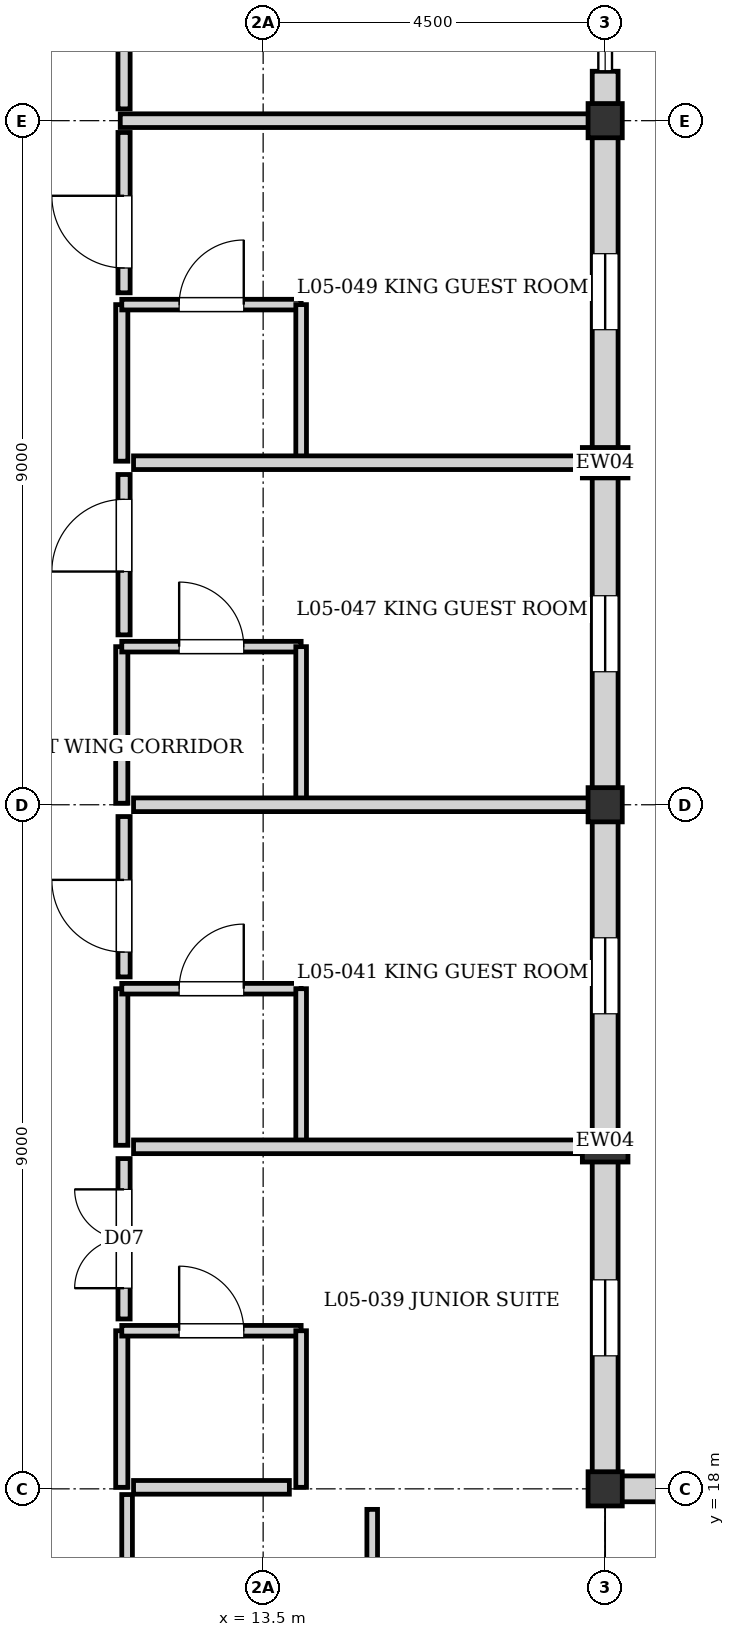
"""IFC4 building model, lengths in metres.
Left out: names, types, materials, properties, quantities, classifications, styles, units other than length and angle.
Written with IfcOpenShell. Run it as: python <this file> out.ifc"""

import sys

from ifc_helpers import new_model, si_unit, direction, frame, frame_2d, origin, origin_2d, place, context, subcontext, project, spatial, rectangle, extrude, element, fill, save


model = new_model("IFC4")
c1 = context("Model", 3, precision=1e-05, world=origin(), true_north=direction((0.0, 1.0)))
c2 = subcontext(c1, "Body", "Model", "MODEL_VIEW")
j1 = project(units=[si_unit("LENGTHUNIT", "METRE"), si_unit("PLANEANGLEUNIT", "RADIAN")], contexts=[c1])
p1 = place(None, origin())
s1 = spatial("IfcSite", under=j1, at=p1, CompositionType="ELEMENT")
p2 = place(p1, origin())
s2 = spatial("IfcBuilding", under=s1, at=p2, CompositionType="ELEMENT")
p3 = place(p2, frame((0.0, 0.0, 17.6)))
s3 = spatial("IfcBuildingStorey", under=s2, at=p3, CompositionType="ELEMENT", Elevation=17.6)
for number, where, z_axis, x_axis in (
    (1, (18.0, 18.0, 0.0), (0.0, 0.0, 1.0), (1.0, 0.0, 0.0)),
    (2, (18.0, 27.0, 0.0), (0.0, 0.0, 1.0), (1.0, 0.0, 0.0)),
    (3, (18.0, 36.0, 0.0), (0.0, 0.0, 1.0), (1.0, 0.0, 0.0)),
):
    element("IfcColumn", number, at=place(p3, frame(where, z_axis=z_axis, x_axis=x_axis)), inside=s3, PredefinedType="COLUMN", context=c2, shape_type="SweptSolid", body=[
        extrude(rectangle(XDim=0.45, YDim=0.45, at=origin_2d()), origin(), (0.0, 0.0, 1.0), 3.04),
    ])
for number, where, z_axis, x_axis in (
    (4, (18.0, 22.5, 0.0), (0.0, 0.0, 1.0), (0.0, 1.0, 0.0)),
    (5, (18.0, 31.5, 0.0), (0.0, 0.0, 1.0), (0.0, 1.0, 0.0)),
):
    element("IfcColumn", number, at=place(p3, frame(where, z_axis=z_axis, x_axis=x_axis)), inside=s3, PredefinedType="PILASTER", context=c2, shape_type="SweptSolid", body=[
        extrude(rectangle(XDim=0.4, YDim=0.6, at=origin_2d()), origin(), (0.0, 0.0, 1.0), 3.04),
    ])
p4 = place(p3, frame((18.0, 36.65, 0.0), z_axis=(0.0, 0.0, 1.0), x_axis=(0.0, -1.0, 0.0)))
e6 = element("IfcWall", 6, at=p4, inside=s3, PredefinedType="SOLIDWALL", context=c2, shape_type="SweptSolid", body=[
    extrude(rectangle(XDim=0.65, YDim=0.34, at=frame_2d((0.325, 0.0))), origin(), (0.0, 0.0, 1.0), 2.82),
])
p5 = place(p3, frame((18.0, 36.0, 0.0), z_axis=(0.0, 0.0, 1.0), x_axis=(0.0, -1.0, 0.0)))
e7 = element("IfcWall", 7, at=p5, inside=s3, PredefinedType="SOLIDWALL", context=c2, shape_type="SweptSolid", body=[
    extrude(rectangle(XDim=9.0, YDim=0.34, at=frame_2d((4.5, 0.0))), origin(), (0.0, 0.0, 1.0), 2.38),
])
p6 = place(p5, frame((1.75, 0.0, 0.35)))
e8 = element("IfcOpeningElement", 8, at=p6, cuts=e7, PredefinedType="OPENING", context=c2, shape_type="SweptSolid", body=[
    extrude(rectangle(XDim=1.0, YDim=1.6, at=frame_2d((0.5, 0.8))), frame((0.0, 0.18, 0.0), z_axis=(0.0, -1.0, 0.0), x_axis=(1.0, 0.0, 0.0)), (0.0, 0.0, 1.0), 0.36),
])
p7 = place(p5, frame((6.25, 0.0, 0.35)))
e9 = element("IfcOpeningElement", 9, at=p7, cuts=e7, PredefinedType="OPENING", context=c2, shape_type="SweptSolid", body=[
    extrude(rectangle(XDim=1.0, YDim=1.6, at=frame_2d((0.5, 0.8))), frame((0.0, 0.18, 0.0), z_axis=(0.0, -1.0, 0.0), x_axis=(1.0, 0.0, 0.0)), (0.0, 0.0, 1.0), 0.36),
])
p8 = place(p3, frame((18.0, 27.0, 0.0), z_axis=(0.0, 0.0, 1.0), x_axis=(0.0, -1.0, 0.0)))
e10 = element("IfcWall", 10, at=p8, inside=s3, PredefinedType="SOLIDWALL", context=c2, shape_type="SweptSolid", body=[
    extrude(rectangle(XDim=8.845, YDim=0.34, at=frame_2d((4.422, 0.0))), origin(), (0.0, 0.0, 1.0), 2.42),
])
p9 = place(p8, frame((1.75, 0.0, 0.35)))
e11 = element("IfcOpeningElement", 11, at=p9, cuts=e10, PredefinedType="OPENING", context=c2, shape_type="SweptSolid", body=[
    extrude(rectangle(XDim=1.0, YDim=1.6, at=frame_2d((0.5, 0.8))), frame((0.0, 0.18, 0.0), z_axis=(0.0, -1.0, 0.0), x_axis=(1.0, 0.0, 0.0)), (0.0, 0.0, 1.0), 0.36),
])
p10 = place(p8, frame((6.25, 0.0, 0.35)))
e12 = element("IfcOpeningElement", 12, at=p10, cuts=e10, PredefinedType="OPENING", context=c2, shape_type="SweptSolid", body=[
    extrude(rectangle(XDim=1.0, YDim=1.6, at=frame_2d((0.5, 0.8))), frame((0.0, 0.18, 0.0), z_axis=(0.0, -1.0, 0.0), x_axis=(1.0, 0.0, 0.0)), (0.0, 0.0, 1.0), 0.36),
])
p11 = place(p3, frame((18.0, 18.0, 0.0), z_axis=(0.0, 0.0, 1.0), x_axis=(1.0, 0.0, 0.0)))
e13 = element("IfcWall", 13, at=p11, inside=s3, PredefinedType="SOLIDWALL", context=c2, shape_type="SweptSolid", body=[
    extrude(rectangle(XDim=9.0, YDim=0.34, at=frame_2d((4.5, 0.0))), origin(), (0.0, 0.0, 1.0), 2.48),
])
p12 = place(p11, frame((1.75, 0.0, 0.35)))
e14 = element("IfcOpeningElement", 14, at=p12, cuts=e13, PredefinedType="OPENING", context=c2, shape_type="SweptSolid", body=[
    extrude(rectangle(XDim=1.0, YDim=1.6, at=frame_2d((0.5, 0.8))), frame((0.0, 0.18, 0.0), z_axis=(0.0, -1.0, 0.0), x_axis=(1.0, 0.0, 0.0)), (0.0, 0.0, 1.0), 0.36),
])
p13 = place(p11, frame((6.25, 0.0, 0.35)))
e15 = element("IfcOpeningElement", 15, at=p13, cuts=e13, PredefinedType="OPENING", context=c2, shape_type="SweptSolid", body=[
    extrude(rectangle(XDim=1.0, YDim=1.6, at=frame_2d((0.5, 0.8))), frame((0.0, 0.18, 0.0), z_axis=(0.0, -1.0, 0.0), x_axis=(1.0, 0.0, 0.0)), (0.0, 0.0, 1.0), 0.36),
])
p14 = place(p3, frame((11.64, 18.02, 0.0), z_axis=(0.0, 0.0, 1.0), x_axis=(0.0, 1.0, 0.0)))
e16 = element("IfcWall", 16, at=p14, inside=s3, PredefinedType="PARTITIONING", context=c2, shape_type="SweptSolid", body=[
    extrude(rectangle(XDim=2.06, YDim=0.16, at=frame_2d((1.03, 0.0))), origin(), (0.0, 0.0, 1.0), 2.82),
])
p15 = place(p3, frame((11.64, 20.08, 0.0), z_axis=(0.0, 0.0, 1.0), x_axis=(1.0, 0.0, 0.0)))
e17 = element("IfcWall", 17, at=p15, inside=s3, PredefinedType="PLUMBINGWALL", context=c2, shape_type="SweptSolid", body=[
    extrude(rectangle(XDim=2.36, YDim=0.14, at=frame_2d((1.18, 0.0))), origin(), (0.0, 0.0, 1.0), 2.82),
])
p16 = place(p15, frame((0.755, 0.0, 0.0)))
e18 = element("IfcOpeningElement", 18, at=p16, cuts=e17, PredefinedType="OPENING", context=c2, shape_type="SweptSolid", body=[
    extrude(rectangle(XDim=0.85, YDim=2.04, at=frame_2d((0.425, 1.02))), frame((0.0, 0.08, 0.0), z_axis=(0.0, -1.0, 0.0), x_axis=(1.0, 0.0, 0.0)), (0.0, 0.0, 1.0), 0.16),
])
p17 = place(p3, frame((14.0, 18.02, 0.0), z_axis=(0.0, 0.0, 1.0), x_axis=(0.0, 1.0, 0.0)))
e19 = element("IfcWall", 19, at=p17, inside=s3, PredefinedType="PLUMBINGWALL", context=c2, shape_type="SweptSolid", body=[
    extrude(rectangle(XDim=2.06, YDim=0.14, at=frame_2d((1.03, 0.0))), origin(), (0.0, 0.0, 1.0), 2.82),
])
p18 = place(p3, frame((11.64, 22.52, 0.0), z_axis=(0.0, 0.0, 1.0), x_axis=(0.0, 1.0, 0.0)))
e20 = element("IfcWall", 20, at=p18, inside=s3, PredefinedType="PARTITIONING", context=c2, shape_type="SweptSolid", body=[
    extrude(rectangle(XDim=2.06, YDim=0.16, at=frame_2d((1.03, 0.0))), origin(), (0.0, 0.0, 1.0), 2.82),
])
p19 = place(p3, frame((11.64, 24.58, 0.0), z_axis=(0.0, 0.0, 1.0), x_axis=(1.0, 0.0, 0.0)))
e21 = element("IfcWall", 21, at=p19, inside=s3, PredefinedType="PLUMBINGWALL", context=c2, shape_type="SweptSolid", body=[
    extrude(rectangle(XDim=2.36, YDim=0.14, at=frame_2d((1.18, 0.0))), origin(), (0.0, 0.0, 1.0), 2.82),
])
p20 = place(p19, frame((0.755, 0.0, 0.0)))
e22 = element("IfcOpeningElement", 22, at=p20, cuts=e21, PredefinedType="OPENING", context=c2, shape_type="SweptSolid", body=[
    extrude(rectangle(XDim=0.85, YDim=2.04, at=frame_2d((0.425, 1.02))), frame((0.0, 0.08, 0.0), z_axis=(0.0, -1.0, 0.0), x_axis=(1.0, 0.0, 0.0)), (0.0, 0.0, 1.0), 0.16),
])
p21 = place(p3, frame((14.0, 22.52, 0.0), z_axis=(0.0, 0.0, 1.0), x_axis=(0.0, 1.0, 0.0)))
e23 = element("IfcWall", 23, at=p21, inside=s3, PredefinedType="PLUMBINGWALL", context=c2, shape_type="SweptSolid", body=[
    extrude(rectangle(XDim=2.06, YDim=0.14, at=frame_2d((1.03, 0.0))), origin(), (0.0, 0.0, 1.0), 2.82),
])
p22 = place(p3, frame((11.64, 27.02, 0.0), z_axis=(0.0, 0.0, 1.0), x_axis=(0.0, 1.0, 0.0)))
e24 = element("IfcWall", 24, at=p22, inside=s3, PredefinedType="PARTITIONING", context=c2, shape_type="SweptSolid", body=[
    extrude(rectangle(XDim=2.06, YDim=0.16, at=frame_2d((1.03, 0.0))), origin(), (0.0, 0.0, 1.0), 2.82),
])
p23 = place(p3, frame((11.64, 29.08, 0.0), z_axis=(0.0, 0.0, 1.0), x_axis=(1.0, 0.0, 0.0)))
e25 = element("IfcWall", 25, at=p23, inside=s3, PredefinedType="PLUMBINGWALL", context=c2, shape_type="SweptSolid", body=[
    extrude(rectangle(XDim=2.36, YDim=0.14, at=frame_2d((1.18, 0.0))), origin(), (0.0, 0.0, 1.0), 2.82),
])
p24 = place(p23, frame((0.755, 0.0, 0.0)))
e26 = element("IfcOpeningElement", 26, at=p24, cuts=e25, PredefinedType="OPENING", context=c2, shape_type="SweptSolid", body=[
    extrude(rectangle(XDim=0.85, YDim=2.04, at=frame_2d((0.425, 1.02))), frame((0.0, 0.08, 0.0), z_axis=(0.0, -1.0, 0.0), x_axis=(1.0, 0.0, 0.0)), (0.0, 0.0, 1.0), 0.16),
])
p25 = place(p3, frame((14.0, 27.02, 0.0), z_axis=(0.0, 0.0, 1.0), x_axis=(0.0, 1.0, 0.0)))
e27 = element("IfcWall", 27, at=p25, inside=s3, PredefinedType="PLUMBINGWALL", context=c2, shape_type="SweptSolid", body=[
    extrude(rectangle(XDim=2.06, YDim=0.14, at=frame_2d((1.03, 0.0))), origin(), (0.0, 0.0, 1.0), 2.82),
])
p26 = place(p3, frame((11.64, 31.52, 0.0), z_axis=(0.0, 0.0, 1.0), x_axis=(0.0, 1.0, 0.0)))
e28 = element("IfcWall", 28, at=p26, inside=s3, PredefinedType="PARTITIONING", context=c2, shape_type="SweptSolid", body=[
    extrude(rectangle(XDim=2.06, YDim=0.16, at=frame_2d((1.03, 0.0))), origin(), (0.0, 0.0, 1.0), 2.82),
])
p27 = place(p3, frame((11.64, 33.58, 0.0), z_axis=(0.0, 0.0, 1.0), x_axis=(1.0, 0.0, 0.0)))
e29 = element("IfcWall", 29, at=p27, inside=s3, PredefinedType="PLUMBINGWALL", context=c2, shape_type="SweptSolid", body=[
    extrude(rectangle(XDim=2.36, YDim=0.14, at=frame_2d((1.18, 0.0))), origin(), (0.0, 0.0, 1.0), 2.82),
])
p28 = place(p27, frame((0.755, 0.0, 0.0)))
e30 = element("IfcOpeningElement", 30, at=p28, cuts=e29, PredefinedType="OPENING", context=c2, shape_type="SweptSolid", body=[
    extrude(rectangle(XDim=0.85, YDim=2.04, at=frame_2d((0.425, 1.02))), frame((0.0, 0.08, 0.0), z_axis=(0.0, -1.0, 0.0), x_axis=(1.0, 0.0, 0.0)), (0.0, 0.0, 1.0), 0.16),
])
p29 = place(p3, frame((14.0, 31.52, 0.0), z_axis=(0.0, 0.0, 1.0), x_axis=(0.0, 1.0, 0.0)))
e31 = element("IfcWall", 31, at=p29, inside=s3, PredefinedType="PLUMBINGWALL", context=c2, shape_type="SweptSolid", body=[
    extrude(rectangle(XDim=2.06, YDim=0.14, at=frame_2d((1.03, 0.0))), origin(), (0.0, 0.0, 1.0), 2.82),
])
p30 = place(p3, frame((11.795, 22.5, 0.0), z_axis=(0.0, 0.0, 1.0), x_axis=(1.0, 0.0, 0.0)))
e32 = element("IfcWall", 32, at=p30, inside=s3, PredefinedType="PARTITIONING", context=c2, shape_type="SweptSolid", body=[
    extrude(rectangle(XDim=6.03, YDim=0.18, at=frame_2d((3.015, 0.0))), origin(), (0.0, 0.0, 1.0), 2.82),
])
p31 = place(p3, frame((11.795, 27.0, 0.0), z_axis=(0.0, 0.0, 1.0), x_axis=(1.0, 0.0, 0.0)))
e33 = element("IfcWall", 33, at=p31, inside=s3, PredefinedType="PARTITIONING", context=c2, shape_type="SweptSolid", body=[
    extrude(rectangle(XDim=6.03, YDim=0.18, at=frame_2d((3.015, 0.0))), origin(), (0.0, 0.0, 1.0), 2.29),
])
p32 = place(p3, frame((11.795, 31.5, 0.0), z_axis=(0.0, 0.0, 1.0), x_axis=(1.0, 0.0, 0.0)))
e34 = element("IfcWall", 34, at=p32, inside=s3, PredefinedType="PARTITIONING", context=c2, shape_type="SweptSolid", body=[
    extrude(rectangle(XDim=6.03, YDim=0.18, at=frame_2d((3.015, 0.0))), origin(), (0.0, 0.0, 1.0), 2.82),
])
p33 = place(p3, frame((11.62, 36.0, 0.0), z_axis=(0.0, 0.0, 1.0), x_axis=(1.0, 0.0, 0.0)))
e35 = element("IfcWall", 35, at=p33, inside=s3, PredefinedType="PARTITIONING", context=c2, shape_type="SweptSolid", body=[
    extrude(rectangle(XDim=6.205, YDim=0.18, at=frame_2d((3.103, 0.0))), origin(), (0.0, 0.0, 1.0), 2.42),
])
p34 = place(p3, frame((11.795, 18.02, 0.0), z_axis=(0.0, 0.0, 1.0), x_axis=(1.0, 0.0, 0.0)))
e36 = element("IfcWall", 36, at=p34, inside=s3, PredefinedType="PARTITIONING", context=c2, shape_type="SweptSolid", body=[
    extrude(rectangle(XDim=2.05, YDim=0.18, at=frame_2d((1.025, 0.0))), origin(), (0.0, 0.0, 1.0), 2.55),
])
p35 = place(p3, frame((11.71, 11.705, 0.0), z_axis=(0.0, 0.0, 1.0), x_axis=(0.0, 1.0, 0.0)))
e37 = element("IfcWall", 37, at=p35, inside=s3, PredefinedType="PLUMBINGWALL", context=c2, shape_type="SweptSolid", body=[
    extrude(rectangle(XDim=6.22, YDim=0.14, at=frame_2d((3.11, 0.0))), origin(), (0.0, 0.0, 1.0), 2.82),
])
p36 = place(p35, frame((1.914, 0.0, 0.0)))
e38 = element("IfcOpeningElement", 38, at=p36, cuts=e37, PredefinedType="OPENING", context=c2, shape_type="SweptSolid", body=[
    extrude(rectangle(XDim=0.9, YDim=2.1, at=frame_2d((0.45, 1.05))), frame((0.0, 0.08, 0.0), z_axis=(0.0, -1.0, 0.0), x_axis=(1.0, 0.0, 0.0)), (0.0, 0.0, 1.0), 0.16),
])
p37 = place(p3, frame((11.67, 20.235, 0.0), z_axis=(0.0, 0.0, 1.0), x_axis=(0.0, 1.0, 0.0)))
e39 = element("IfcWall", 39, at=p37, inside=s3, PredefinedType="PARTITIONING", context=c2, shape_type="SweptSolid", body=[
    extrude(rectangle(XDim=2.11, YDim=0.16, at=frame_2d((1.055, 0.0))), origin(), (0.0, 0.0, 1.0), 2.82),
])
p38 = place(p37, frame((0.405, 0.0, 0.0)))
e40 = element("IfcOpeningElement", 40, at=p38, cuts=e39, PredefinedType="OPENING", context=c2, shape_type="SweptSolid", body=[
    extrude(rectangle(XDim=1.3, YDim=2.25, at=frame_2d((0.65, 1.125))), frame((0.0, 0.09, 0.0), z_axis=(0.0, -1.0, 0.0), x_axis=(1.0, 0.0, 0.0)), (0.0, 0.0, 1.0), 0.18),
])
p39 = place(p3, frame((11.67, 24.735, 0.0), z_axis=(0.0, 0.0, 1.0), x_axis=(0.0, 1.0, 0.0)))
e41 = element("IfcWall", 41, at=p39, inside=s3, PredefinedType="PARTITIONING", context=c2, shape_type="SweptSolid", body=[
    extrude(rectangle(XDim=2.11, YDim=0.16, at=frame_2d((1.055, 0.0))), origin(), (0.0, 0.0, 1.0), 2.82),
])
p40 = place(p39, frame((0.327, 0.0, 0.0)))
e42 = element("IfcOpeningElement", 42, at=p40, cuts=e41, PredefinedType="OPENING", context=c2, shape_type="SweptSolid", body=[
    extrude(rectangle(XDim=0.95, YDim=2.15, at=frame_2d((0.475, 1.075))), frame((0.0, 0.09, 0.0), z_axis=(0.0, -1.0, 0.0), x_axis=(1.0, 0.0, 0.0)), (0.0, 0.0, 1.0), 0.18),
])
p41 = place(p3, frame((11.67, 29.235, 0.0), z_axis=(0.0, 0.0, 1.0), x_axis=(0.0, 1.0, 0.0)))
e43 = element("IfcWall", 43, at=p41, inside=s3, PredefinedType="PARTITIONING", context=c2, shape_type="SweptSolid", body=[
    extrude(rectangle(XDim=2.11, YDim=0.16, at=frame_2d((1.055, 0.0))), origin(), (0.0, 0.0, 1.0), 2.82),
])
p42 = place(p41, frame((0.833, 0.0, 0.0)))
e44 = element("IfcOpeningElement", 44, at=p42, cuts=e43, PredefinedType="OPENING", context=c2, shape_type="SweptSolid", body=[
    extrude(rectangle(XDim=0.95, YDim=2.15, at=frame_2d((0.475, 1.075))), frame((0.0, 0.09, 0.0), z_axis=(0.0, -1.0, 0.0), x_axis=(1.0, 0.0, 0.0)), (0.0, 0.0, 1.0), 0.18),
])
p43 = place(p3, frame((11.67, 33.735, 0.0), z_axis=(0.0, 0.0, 1.0), x_axis=(0.0, 1.0, 0.0)))
e45 = element("IfcWall", 45, at=p43, inside=s3, PredefinedType="PARTITIONING", context=c2, shape_type="SweptSolid", body=[
    extrude(rectangle(XDim=2.11, YDim=0.16, at=frame_2d((1.055, 0.0))), origin(), (0.0, 0.0, 1.0), 2.82),
])
p44 = place(p43, frame((0.327, 0.0, 0.0)))
e46 = element("IfcOpeningElement", 46, at=p44, cuts=e45, PredefinedType="OPENING", context=c2, shape_type="SweptSolid", body=[
    extrude(rectangle(XDim=0.95, YDim=2.15, at=frame_2d((0.475, 1.075))), frame((0.0, 0.09, 0.0), z_axis=(0.0, -1.0, 0.0), x_axis=(1.0, 0.0, 0.0)), (0.0, 0.0, 1.0), 0.18),
])
p45 = place(p3, frame((11.67, 36.155, 0.0), z_axis=(0.0, 0.0, 1.0), x_axis=(0.0, 1.0, 0.0)))
e47 = element("IfcWall", 47, at=p45, inside=s3, PredefinedType="PARTITIONING", context=c2, shape_type="SweptSolid", body=[
    extrude(rectangle(XDim=4.125, YDim=0.16, at=frame_2d((2.062, 0.0))), origin(), (0.0, 0.0, 1.0), 2.82),
])
p46 = place(p45, frame((2.058, 0.0, 0.0)))
e48 = element("IfcOpeningElement", 48, at=p46, cuts=e47, PredefinedType="OPENING", context=c2, shape_type="SweptSolid", body=[
    extrude(rectangle(XDim=1.0, YDim=2.1, at=frame_2d((0.5, 1.05))), frame((0.0, 0.09, 0.0), z_axis=(0.0, -1.0, 0.0), x_axis=(1.0, 0.0, 0.0)), (0.0, 0.0, 1.0), 0.18),
])
p47 = place(p3, frame((14.935, 14.845, 0.0), z_axis=(0.0, 0.0, 1.0), x_axis=(0.0, 1.0, 0.0)))
e49 = element("IfcWall", 49, at=p47, inside=s3, PredefinedType="PLUMBINGWALL", context=c2, shape_type="SweptSolid", body=[
    extrude(rectangle(XDim=2.885, YDim=0.14, at=frame_2d((1.442, 0.0))), origin(), (0.0, 0.0, 1.0), 2.82),
])
p48 = place(p47, frame((0.646, 0.0, 0.0)))
e50 = element("IfcOpeningElement", 50, at=p48, cuts=e49, PredefinedType="OPENING", context=c2, shape_type="SweptSolid", body=[
    extrude(rectangle(XDim=0.9, YDim=2.1, at=frame_2d((0.45, 1.05))), frame((0.0, 0.08, 0.0), z_axis=(0.0, -1.0, 0.0), x_axis=(1.0, 0.0, 0.0)), (0.0, 0.0, 1.0), 0.16),
])
p49 = place(p6, origin())
e51 = element("IfcWindow", 51, at=p49, inside=s3, PartitioningType="SINGLE_PANEL", PredefinedType="WINDOW", context=c2, shape_type="SweptSolid", body=[
    extrude(rectangle(XDim=1.0, YDim=1.6, at=frame_2d((0.5, 0.8))), frame((0.0, 0.03, 0.0), z_axis=(0.0, -1.0, 0.0), x_axis=(1.0, 0.0, 0.0)), (0.0, 0.0, 1.0), 0.06),
])
fill(e8, e51)
p50 = place(p7, origin())
e52 = element("IfcWindow", 52, at=p50, inside=s3, PartitioningType="SINGLE_PANEL", PredefinedType="WINDOW", context=c2, shape_type="SweptSolid", body=[
    extrude(rectangle(XDim=1.0, YDim=1.6, at=frame_2d((0.5, 0.8))), frame((0.0, 0.03, 0.0), z_axis=(0.0, -1.0, 0.0), x_axis=(1.0, 0.0, 0.0)), (0.0, 0.0, 1.0), 0.06),
])
fill(e9, e52)
p51 = place(p9, origin())
e53 = element("IfcWindow", 53, at=p51, inside=s3, PartitioningType="SINGLE_PANEL", PredefinedType="WINDOW", context=c2, shape_type="SweptSolid", body=[
    extrude(rectangle(XDim=1.0, YDim=1.6, at=frame_2d((0.5, 0.8))), frame((0.0, 0.03, 0.0), z_axis=(0.0, -1.0, 0.0), x_axis=(1.0, 0.0, 0.0)), (0.0, 0.0, 1.0), 0.06),
])
fill(e11, e53)
p52 = place(p10, origin())
e54 = element("IfcWindow", 54, at=p52, inside=s3, PartitioningType="SINGLE_PANEL", PredefinedType="WINDOW", context=c2, shape_type="SweptSolid", body=[
    extrude(rectangle(XDim=1.0, YDim=1.6, at=frame_2d((0.5, 0.8))), frame((0.0, 0.03, 0.0), z_axis=(0.0, -1.0, 0.0), x_axis=(1.0, 0.0, 0.0)), (0.0, 0.0, 1.0), 0.06),
])
fill(e12, e54)
p53 = place(p16, origin())
e55 = element("IfcDoor", 55, at=p53, inside=s3, OperationType="SINGLE_SWING_LEFT", PredefinedType="DOOR", context=c2, shape_type="SweptSolid", body=[
    extrude(rectangle(XDim=0.85, YDim=2.04, at=frame_2d((0.425, 1.02))), frame((0.0, 0.025, 0.0), z_axis=(0.0, -1.0, 0.0), x_axis=(1.0, 0.0, 0.0)), (0.0, 0.0, 1.0), 0.05),
])
fill(e18, e55)
p54 = place(p20, origin())
e56 = element("IfcDoor", 56, at=p54, inside=s3, OperationType="SINGLE_SWING_RIGHT", PredefinedType="DOOR", context=c2, shape_type="SweptSolid", body=[
    extrude(rectangle(XDim=0.85, YDim=2.04, at=frame_2d((0.425, 1.02))), frame((0.0, 0.025, 0.0), z_axis=(0.0, -1.0, 0.0), x_axis=(1.0, 0.0, 0.0)), (0.0, 0.0, 1.0), 0.05),
])
fill(e22, e56)
p55 = place(p24, origin())
e57 = element("IfcDoor", 57, at=p55, inside=s3, OperationType="SINGLE_SWING_LEFT", PredefinedType="DOOR", context=c2, shape_type="SweptSolid", body=[
    extrude(rectangle(XDim=0.85, YDim=2.04, at=frame_2d((0.425, 1.02))), frame((0.0, 0.025, 0.0), z_axis=(0.0, -1.0, 0.0), x_axis=(1.0, 0.0, 0.0)), (0.0, 0.0, 1.0), 0.05),
])
fill(e26, e57)
p56 = place(p28, origin())
e58 = element("IfcDoor", 58, at=p56, inside=s3, OperationType="SINGLE_SWING_RIGHT", PredefinedType="DOOR", context=c2, shape_type="SweptSolid", body=[
    extrude(rectangle(XDim=0.85, YDim=2.04, at=frame_2d((0.425, 1.02))), frame((0.0, 0.025, 0.0), z_axis=(0.0, -1.0, 0.0), x_axis=(1.0, 0.0, 0.0)), (0.0, 0.0, 1.0), 0.05),
])
fill(e30, e58)
p57 = place(p38, origin())
e59 = element("IfcDoor", 59, at=p57, inside=s3, OperationType="DOUBLE_DOOR_SINGLE_SWING", PredefinedType="DOOR", context=c2, shape_type="SweptSolid", body=[
    extrude(rectangle(XDim=1.3, YDim=2.25, at=frame_2d((0.65, 1.125))), frame((0.0, 0.025, 0.0), z_axis=(0.0, -1.0, 0.0), x_axis=(1.0, 0.0, 0.0)), (0.0, 0.0, 1.0), 0.05),
])
fill(e40, e59)
p58 = place(p40, origin())
e60 = element("IfcDoor", 60, at=p58, inside=s3, OperationType="SINGLE_SWING_RIGHT", PredefinedType="DOOR", context=c2, shape_type="SweptSolid", body=[
    extrude(rectangle(XDim=0.95, YDim=2.15, at=frame_2d((0.475, 1.075))), frame((0.0, 0.025, 0.0), z_axis=(0.0, -1.0, 0.0), x_axis=(1.0, 0.0, 0.0)), (0.0, 0.0, 1.0), 0.05),
])
fill(e42, e60)
p59 = place(p42, origin())
e61 = element("IfcDoor", 61, at=p59, inside=s3, OperationType="SINGLE_SWING_LEFT", PredefinedType="DOOR", context=c2, shape_type="SweptSolid", body=[
    extrude(rectangle(XDim=0.95, YDim=2.15, at=frame_2d((0.475, 1.075))), frame((0.0, 0.025, 0.0), z_axis=(0.0, -1.0, 0.0), x_axis=(1.0, 0.0, 0.0)), (0.0, 0.0, 1.0), 0.05),
])
fill(e44, e61)
p60 = place(p44, origin())
e62 = element("IfcDoor", 62, at=p60, inside=s3, OperationType="SINGLE_SWING_RIGHT", PredefinedType="DOOR", context=c2, shape_type="SweptSolid", body=[
    extrude(rectangle(XDim=0.95, YDim=2.15, at=frame_2d((0.475, 1.075))), frame((0.0, 0.025, 0.0), z_axis=(0.0, -1.0, 0.0), x_axis=(1.0, 0.0, 0.0)), (0.0, 0.0, 1.0), 0.05),
])
fill(e46, e62)
save(model, sys.argv[1])
